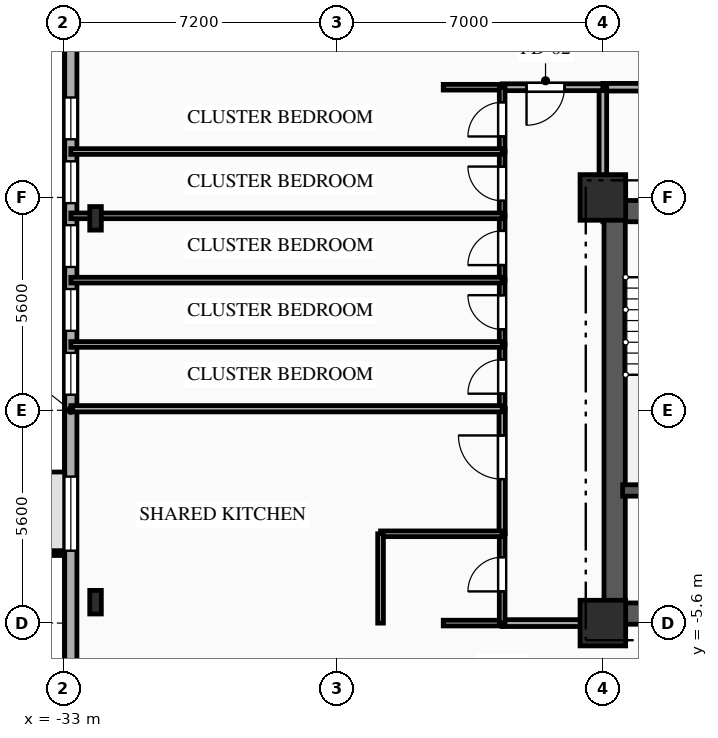
"""IFC4 building model, lengths in metres.
Left out: names, types, materials, properties, quantities, classifications, styles, units other than length and angle.
Written with IfcOpenShell. Run it as: python <this file> out.ifc"""

import sys

from ifc_helpers import new_model, si_unit, direction, frame, frame_2d, origin, origin_2d, place, context, subcontext, project, spatial, rectangle, i_section, extrude, element, fill, save


model = new_model("IFC4")
c1 = context("Model", 3, precision=1e-05, world=origin(), true_north=direction((0.0, 1.0)))
c2 = subcontext(c1, "Body", "Model", "MODEL_VIEW")
j1 = project(units=[si_unit("LENGTHUNIT", "METRE"), si_unit("PLANEANGLEUNIT", "RADIAN")], contexts=[c1])
p1 = place(None, origin())
s1 = spatial("IfcSite", under=j1, at=p1, CompositionType="ELEMENT")
p2 = place(p1, origin())
s2 = spatial("IfcBuilding", under=s1, at=p2, CompositionType="ELEMENT")
p3 = place(p2, frame((0.0, 0.0, 47.1)))
s3 = spatial("IfcBuildingStorey", under=s2, at=p3, CompositionType="ELEMENT", Elevation=47.1)
for number, where, z_axis, x_axis in (
    (1, (-18.8, -5.6, 0.0), (0.0, 0.0, 1.0), (1.0, 0.0, 0.0)),
    (2, (-18.8, 5.6, 0.0), (0.0, 0.0, 1.0), (1.0, 0.0, 0.0)),
):
    element("IfcColumn", number, at=place(p3, frame(where, z_axis=z_axis, x_axis=x_axis)), inside=s3, PredefinedType="COLUMN", context=c2, shape_type="SweptSolid", body=[
        extrude(rectangle(XDim=1.2, YDim=1.2, at=origin_2d()), origin(), (0.0, 0.0, 1.0), 3.35),
    ])
for number, where, z_axis, x_axis in (
    (3, (-32.15, 5.05, 0.0), (0.0, 0.0, 1.0), (1.0, 0.0, 0.0)),
    (4, (-32.15, -5.05, 0.0), (0.0, 0.0, 1.0), (1.0, 0.0, 0.0)),
):
    element("IfcColumn", number, at=place(p3, frame(where, z_axis=z_axis, x_axis=x_axis)), inside=s3, PredefinedType="COLUMN", context=c2, shape_type="SweptSolid", body=[
        extrude(i_section(OverallWidth=0.305, OverallDepth=0.62, WebThickness=0.021, FlangeThickness=0.04, FilletRadius=0.027, at=origin_2d()), origin(), (0.0, 0.0, 1.0), 3.35),
    ])
p4 = place(p3, frame((-32.8, -15.8, 0.0), z_axis=(0.0, 0.0, 1.0), x_axis=(0.0, 1.0, 0.0)))
e5 = element("IfcWall", 5, at=p4, inside=s3, PredefinedType="SOLIDWALL", context=c2, shape_type="SweptSolid", body=[
    extrude(rectangle(XDim=31.6, YDim=0.32, at=frame_2d((15.8, 0.0))), origin(), (0.0, 0.0, 1.0), 3.035),
])
p5 = place(p4, frame((12.105, 0.0, 0.85)))
e6 = element("IfcOpeningElement", 6, at=p5, cuts=e5, PredefinedType="OPENING", context=c2, shape_type="SweptSolid", body=[
    extrude(rectangle(XDim=1.95, YDim=1.85, at=frame_2d((0.975, 0.925))), frame((0.0, 0.17, 0.0), z_axis=(0.0, -1.0, 0.0), x_axis=(1.0, 0.0, 0.0)), (0.0, 0.0, 1.0), 0.34),
])
p6 = place(p4, frame((16.21, 0.0, 0.85)))
e7 = element("IfcOpeningElement", 7, at=p6, cuts=e5, PredefinedType="OPENING", context=c2, shape_type="SweptSolid", body=[
    extrude(rectangle(XDim=1.1, YDim=1.85, at=frame_2d((0.55, 0.925))), frame((0.0, 0.17, 0.0), z_axis=(0.0, -1.0, 0.0), x_axis=(1.0, 0.0, 0.0)), (0.0, 0.0, 1.0), 0.34),
])
p7 = place(p4, frame((17.89, 0.0, 0.85)))
e8 = element("IfcOpeningElement", 8, at=p7, cuts=e5, PredefinedType="OPENING", context=c2, shape_type="SweptSolid", body=[
    extrude(rectangle(XDim=1.1, YDim=1.85, at=frame_2d((0.55, 0.925))), frame((0.0, 0.17, 0.0), z_axis=(0.0, -1.0, 0.0), x_axis=(1.0, 0.0, 0.0)), (0.0, 0.0, 1.0), 0.34),
])
p8 = place(p4, frame((19.57, 0.0, 0.85)))
e9 = element("IfcOpeningElement", 9, at=p8, cuts=e5, PredefinedType="OPENING", context=c2, shape_type="SweptSolid", body=[
    extrude(rectangle(XDim=1.1, YDim=1.85, at=frame_2d((0.55, 0.925))), frame((0.0, 0.17, 0.0), z_axis=(0.0, -1.0, 0.0), x_axis=(1.0, 0.0, 0.0)), (0.0, 0.0, 1.0), 0.34),
])
p9 = place(p4, frame((21.25, 0.0, 0.85)))
e10 = element("IfcOpeningElement", 10, at=p9, cuts=e5, PredefinedType="OPENING", context=c2, shape_type="SweptSolid", body=[
    extrude(rectangle(XDim=1.1, YDim=1.85, at=frame_2d((0.55, 0.925))), frame((0.0, 0.17, 0.0), z_axis=(0.0, -1.0, 0.0), x_axis=(1.0, 0.0, 0.0)), (0.0, 0.0, 1.0), 0.34),
])
p10 = place(p4, frame((22.93, 0.0, 0.85)))
e11 = element("IfcOpeningElement", 11, at=p10, cuts=e5, PredefinedType="OPENING", context=c2, shape_type="SweptSolid", body=[
    extrude(rectangle(XDim=1.1, YDim=1.85, at=frame_2d((0.55, 0.925))), frame((0.0, 0.17, 0.0), z_axis=(0.0, -1.0, 0.0), x_axis=(1.0, 0.0, 0.0)), (0.0, 0.0, 1.0), 0.34),
])
p11 = place(p3, frame((-18.8, 5.24, 0.0), z_axis=(0.0, 0.0, 1.0), x_axis=(1.0, 0.0, 0.0)))
e12 = element("IfcWall", 12, at=p11, inside=s3, PredefinedType="SHEAR", context=c2, shape_type="SweptSolid", body=[
    extrude(rectangle(XDim=9.6, YDim=0.56, at=frame_2d((4.8, 0.0))), origin(), (0.0, 0.0, 1.0), 3.035),
])
p12 = place(p11, frame((1.55, 0.0, 0.0)))
e13 = element("IfcOpeningElement", 13, at=p12, cuts=e12, PredefinedType="OPENING", context=c2, shape_type="SweptSolid", body=[
    extrude(rectangle(XDim=1.1, YDim=2.15, at=frame_2d((0.55, 1.075))), frame((0.0, 0.29, 0.0), z_axis=(0.0, -1.0, 0.0), x_axis=(1.0, 0.0, 0.0)), (0.0, 0.0, 1.0), 0.58),
])
p13 = place(p11, frame((4.775, 0.0, 0.0)))
e14 = element("IfcOpeningElement", 14, at=p13, cuts=e12, PredefinedType="OPENING", context=c2, shape_type="SweptSolid", body=[
    extrude(rectangle(XDim=1.05, YDim=2.1, at=frame_2d((0.525, 1.05))), frame((0.0, 0.29, 0.0), z_axis=(0.0, -1.0, 0.0), x_axis=(1.0, 0.0, 0.0)), (0.0, 0.0, 1.0), 0.58),
])
p14 = place(p3, frame((-18.8, -5.35, 0.0), z_axis=(0.0, 0.0, 1.0), x_axis=(1.0, 0.0, 0.0)))
e15 = element("IfcWall", 15, at=p14, inside=s3, PredefinedType="SHEAR", context=c2, shape_type="SweptSolid", body=[
    extrude(rectangle(XDim=9.6, YDim=0.56, at=frame_2d((4.8, 0.0))), origin(), (0.0, 0.0, 1.0), 3.035),
])
p15 = place(p14, frame((1.05, 0.0, 0.0)))
e16 = element("IfcOpeningElement", 16, at=p15, cuts=e15, PredefinedType="OPENING", context=c2, shape_type="SweptSolid", body=[
    extrude(rectangle(XDim=0.9, YDim=2.1, at=frame_2d((0.45, 1.05))), frame((0.0, 0.29, 0.0), z_axis=(0.0, -1.0, 0.0), x_axis=(1.0, 0.0, 0.0)), (0.0, 0.0, 1.0), 0.58),
])
p16 = place(p3, frame((-18.49, -5.05, 0.0), z_axis=(0.0, 0.0, 1.0), x_axis=(0.0, 1.0, 0.0)))
e17 = element("IfcWall", 17, at=p16, inside=s3, PredefinedType="SHEAR", context=c2, shape_type="SweptSolid", body=[
    extrude(rectangle(XDim=10.1, YDim=0.56, at=frame_2d((5.05, 0.0))), origin(), (0.0, 0.0, 1.0), 3.035),
])
p17 = place(p3, frame((-18.28, -2.11, 0.0), z_axis=(0.0, 0.0, 1.0), x_axis=(1.0, 0.0, 0.0)))
e18 = element("IfcWall", 18, at=p17, inside=s3, PredefinedType="SHEAR", context=c2, shape_type="SweptSolid", body=[
    extrude(rectangle(XDim=3.18, YDim=0.3, at=frame_2d((1.59, 0.0))), origin(), (0.0, 0.0, 1.0), 3.035),
])
p18 = place(p3, frame((-12.0, 8.5, 0.0), z_axis=(0.0, 0.0, 1.0), x_axis=(-1.0, 0.0, 0.0)))
e19 = element("IfcWall", 19, at=p18, inside=s3, PredefinedType="PARTITIONING", context=c2, shape_type="SweptSolid", body=[
    extrude(rectangle(XDim=6.8, YDim=0.2, at=frame_2d((3.4, 0.0))), origin(), (0.0, 0.0, 1.0), 3.035),
])
p19 = place(p18, frame((1.715, 0.0, 0.0)))
e20 = element("IfcOpeningElement", 20, at=p19, cuts=e19, PredefinedType="OPENING", context=c2, shape_type="SweptSolid", body=[
    extrude(rectangle(XDim=1.1, YDim=2.15, at=frame_2d((0.55, 1.075))), frame((0.0, 0.11, 0.0), z_axis=(0.0, -1.0, 0.0), x_axis=(1.0, 0.0, 0.0)), (0.0, 0.0, 1.0), 0.22),
])
p20 = place(p3, frame((-18.8, 8.5, 0.0), z_axis=(0.0, 0.0, 1.0), x_axis=(0.0, -1.0, 0.0)))
e21 = element("IfcWall", 21, at=p20, inside=s3, PredefinedType="PARTITIONING", context=c2, shape_type="SweptSolid", body=[
    extrude(rectangle(XDim=2.9, YDim=0.2, at=frame_2d((1.45, 0.0))), origin(), (0.0, 0.0, 1.0), 2.52),
])
p21 = place(p3, frame((-18.8, 8.5, 0.0), z_axis=(0.0, 0.0, 1.0), x_axis=(-1.0, 0.0, 0.0)))
e22 = element("IfcWall", 22, at=p21, inside=s3, PredefinedType="PARTITIONING", context=c2, shape_type="SweptSolid", body=[
    extrude(rectangle(XDim=2.65, YDim=0.18, at=frame_2d((1.325, 0.0))), origin(), (0.0, 0.0, 1.0), 3.035),
])
p22 = place(p21, frame((1.009, 0.0, 0.0)))
e23 = element("IfcOpeningElement", 23, at=p22, cuts=e22, PredefinedType="OPENING", context=c2, shape_type="SweptSolid", body=[
    extrude(rectangle(XDim=1.0, YDim=2.15, at=frame_2d((0.5, 1.075))), frame((0.0, 0.1, 0.0), z_axis=(0.0, -1.0, 0.0), x_axis=(1.0, 0.0, 0.0)), (0.0, 0.0, 1.0), 0.2),
])
p23 = place(p3, frame((-21.45, 8.5, 0.0), z_axis=(0.0, 0.0, 1.0), x_axis=(-1.0, 0.0, 0.0)))
e24 = element("IfcWall", 24, at=p23, inside=s3, PredefinedType="PARTITIONING", context=c2, shape_type="SweptSolid", body=[
    extrude(rectangle(XDim=1.55, YDim=0.15, at=frame_2d((0.775, 0.0))), origin(), (0.0, 0.0, 1.0), 3.035),
])
p24 = place(p3, frame((-21.45, -5.6, 0.0), z_axis=(0.0, 0.0, 1.0), x_axis=(1.0, 0.0, 0.0)))
e25 = element("IfcWall", 25, at=p24, inside=s3, PredefinedType="PARTITIONING", context=c2, shape_type="SweptSolid", body=[
    extrude(rectangle(XDim=2.65, YDim=0.18, at=frame_2d((1.325, 0.0))), origin(), (0.0, 0.0, 1.0), 3.035),
])
p25 = place(p3, frame((-23.0, -5.6, 0.0), z_axis=(0.0, 0.0, 1.0), x_axis=(1.0, 0.0, 0.0)))
e26 = element("IfcWall", 26, at=p25, inside=s3, PredefinedType="PLUMBINGWALL", context=c2, shape_type="SweptSolid", body=[
    extrude(rectangle(XDim=1.55, YDim=0.15, at=frame_2d((0.775, 0.0))), origin(), (0.0, 0.0, 1.0), 3.035),
])
p26 = place(p3, frame((-21.45, -5.6, 0.0), z_axis=(0.0, 0.0, 1.0), x_axis=(0.0, 1.0, 0.0)))
e27 = element("IfcWall", 27, at=p26, inside=s3, PredefinedType="PLUMBINGWALL", context=c2, shape_type="SweptSolid", body=[
    extrude(rectangle(XDim=2.35, YDim=0.15, at=frame_2d((1.175, 0.0))), origin(), (0.0, 0.0, 1.0), 3.035),
])
p27 = place(p26, frame((0.834, 0.0, 0.0)))
e28 = element("IfcOpeningElement", 28, at=p27, cuts=e27, PredefinedType="OPENING", context=c2, shape_type="SweptSolid", body=[
    extrude(rectangle(XDim=0.9, YDim=2.1, at=frame_2d((0.45, 1.05))), frame((0.0, 0.085, 0.0), z_axis=(0.0, -1.0, 0.0), x_axis=(1.0, 0.0, 0.0)), (0.0, 0.0, 1.0), 0.17),
])
p28 = place(p3, frame((-21.45, -3.25, 0.0), z_axis=(0.0, 0.0, 1.0), x_axis=(0.0, 1.0, 0.0)))
e29 = element("IfcWall", 29, at=p28, inside=s3, PredefinedType="PARTITIONING", context=c2, shape_type="SweptSolid", body=[
    extrude(rectangle(XDim=3.29, YDim=0.165, at=frame_2d((1.645, 0.0))), origin(), (0.0, 0.0, 1.0), 3.035),
])
p29 = place(p28, frame((1.438, 0.0, 0.0)))
e30 = element("IfcOpeningElement", 30, at=p29, cuts=e29, PredefinedType="OPENING", context=c2, shape_type="SweptSolid", body=[
    extrude(rectangle(XDim=1.15, YDim=2.15, at=frame_2d((0.575, 1.075))), frame((0.0, 0.093, 0.0), z_axis=(0.0, -1.0, 0.0), x_axis=(1.0, 0.0, 0.0)), (0.0, 0.0, 1.0), 0.185),
])
p30 = place(p3, frame((-21.45, 0.04, 0.0), z_axis=(0.0, 0.0, 1.0), x_axis=(0.0, 1.0, 0.0)))
e31 = element("IfcWall", 31, at=p30, inside=s3, PredefinedType="PARTITIONING", context=c2, shape_type="SweptSolid", body=[
    extrude(rectangle(XDim=1.692, YDim=0.15, at=frame_2d((0.846, 0.0))), origin(), (0.0, 0.0, 1.0), 3.035),
])
p31 = place(p30, frame((0.396, 0.0, 0.0)))
e32 = element("IfcOpeningElement", 32, at=p31, cuts=e31, PredefinedType="OPENING", context=c2, shape_type="SweptSolid", body=[
    extrude(rectangle(XDim=0.9, YDim=2.1, at=frame_2d((0.45, 1.05))), frame((0.0, 0.085, 0.0), z_axis=(0.0, -1.0, 0.0), x_axis=(1.0, 0.0, 0.0)), (0.0, 0.0, 1.0), 0.17),
])
p32 = place(p3, frame((-21.45, 1.732, 0.0), z_axis=(0.0, 0.0, 1.0), x_axis=(0.0, 1.0, 0.0)))
e33 = element("IfcWall", 33, at=p32, inside=s3, PredefinedType="PARTITIONING", context=c2, shape_type="SweptSolid", body=[
    extrude(rectangle(XDim=1.692, YDim=0.15, at=frame_2d((0.846, 0.0))), origin(), (0.0, 0.0, 1.0), 3.035),
])
p33 = place(p32, frame((0.396, 0.0, 0.0)))
e34 = element("IfcOpeningElement", 34, at=p33, cuts=e33, PredefinedType="OPENING", context=c2, shape_type="SweptSolid", body=[
    extrude(rectangle(XDim=0.9, YDim=2.1, at=frame_2d((0.45, 1.05))), frame((0.0, 0.085, 0.0), z_axis=(0.0, -1.0, 0.0), x_axis=(1.0, 0.0, 0.0)), (0.0, 0.0, 1.0), 0.17),
])
p34 = place(p3, frame((-21.45, 3.424, 0.0), z_axis=(0.0, 0.0, 1.0), x_axis=(0.0, 1.0, 0.0)))
e35 = element("IfcWall", 35, at=p34, inside=s3, PredefinedType="PARTITIONING", context=c2, shape_type="SweptSolid", body=[
    extrude(rectangle(XDim=1.692, YDim=0.15, at=frame_2d((0.846, 0.0))), origin(), (0.0, 0.0, 1.0), 3.035),
])
p35 = place(p34, frame((0.396, 0.0, 0.0)))
e36 = element("IfcOpeningElement", 36, at=p35, cuts=e35, PredefinedType="OPENING", context=c2, shape_type="SweptSolid", body=[
    extrude(rectangle(XDim=0.9, YDim=2.1, at=frame_2d((0.45, 1.05))), frame((0.0, 0.085, 0.0), z_axis=(0.0, -1.0, 0.0), x_axis=(1.0, 0.0, 0.0)), (0.0, 0.0, 1.0), 0.17),
])
p36 = place(p3, frame((-21.45, 5.116, 0.0), z_axis=(0.0, 0.0, 1.0), x_axis=(0.0, 1.0, 0.0)))
e37 = element("IfcWall", 37, at=p36, inside=s3, PredefinedType="PARTITIONING", context=c2, shape_type="SweptSolid", body=[
    extrude(rectangle(XDim=1.692, YDim=0.15, at=frame_2d((0.846, 0.0))), origin(), (0.0, 0.0, 1.0), 3.035),
])
p37 = place(p36, frame((0.396, 0.0, 0.0)))
e38 = element("IfcOpeningElement", 38, at=p37, cuts=e37, PredefinedType="OPENING", context=c2, shape_type="SweptSolid", body=[
    extrude(rectangle(XDim=0.9, YDim=2.1, at=frame_2d((0.45, 1.05))), frame((0.0, 0.085, 0.0), z_axis=(0.0, -1.0, 0.0), x_axis=(1.0, 0.0, 0.0)), (0.0, 0.0, 1.0), 0.17),
])
p38 = place(p3, frame((-21.45, 6.808, 0.0), z_axis=(0.0, 0.0, 1.0), x_axis=(0.0, 1.0, 0.0)))
e39 = element("IfcWall", 39, at=p38, inside=s3, PredefinedType="PARTITIONING", context=c2, shape_type="SweptSolid", body=[
    extrude(rectangle(XDim=1.692, YDim=0.15, at=frame_2d((0.846, 0.0))), origin(), (0.0, 0.0, 1.0), 3.035),
])
p39 = place(p38, frame((0.396, 0.0, 0.0)))
e40 = element("IfcOpeningElement", 40, at=p39, cuts=e39, PredefinedType="OPENING", context=c2, shape_type="SweptSolid", body=[
    extrude(rectangle(XDim=0.9, YDim=2.1, at=frame_2d((0.45, 1.05))), frame((0.0, 0.085, 0.0), z_axis=(0.0, -1.0, 0.0), x_axis=(1.0, 0.0, 0.0)), (0.0, 0.0, 1.0), 0.17),
])
p40 = place(p3, frame((-24.65, -3.25, 0.0), z_axis=(0.0, 0.0, 1.0), x_axis=(1.0, 0.0, 0.0)))
e41 = element("IfcWall", 41, at=p40, inside=s3, PredefinedType="PLUMBINGWALL", context=c2, shape_type="SweptSolid", body=[
    extrude(rectangle(XDim=3.2, YDim=0.15, at=frame_2d((1.6, 0.0))), origin(), (0.0, 0.0, 1.0), 2.52),
])
p41 = place(p3, frame((-24.65, -5.6, 0.0), z_axis=(0.0, 0.0, 1.0), x_axis=(0.0, 1.0, 0.0)))
e42 = element("IfcWall", 42, at=p41, inside=s3, PredefinedType="PLUMBINGWALL", context=c2, shape_type="SweptSolid", body=[
    extrude(rectangle(XDim=2.35, YDim=0.15, at=frame_2d((1.175, 0.0))), origin(), (0.0, 0.0, 1.0), 3.035),
])
p42 = place(p3, frame((-32.8, 0.04, 0.0), z_axis=(0.0, 0.0, 1.0), x_axis=(1.0, 0.0, 0.0)))
e43 = element("IfcWall", 43, at=p42, inside=s3, PredefinedType="PARTITIONING", context=c2, shape_type="SweptSolid", body=[
    extrude(rectangle(XDim=11.35, YDim=0.165, at=frame_2d((5.675, 0.0))), origin(), (0.0, 0.0, 1.0), 3.035),
])
p43 = place(p3, frame((-32.8, 1.732, 0.0), z_axis=(0.0, 0.0, 1.0), x_axis=(1.0, 0.0, 0.0)))
e44 = element("IfcWall", 44, at=p43, inside=s3, PredefinedType="PARTITIONING", context=c2, shape_type="SweptSolid", body=[
    extrude(rectangle(XDim=11.35, YDim=0.15, at=frame_2d((5.675, 0.0))), origin(), (0.0, 0.0, 1.0), 3.035),
])
for number, where, z_axis, x_axis in (
    (45, (-32.8, 3.424, 0.0), (0.0, 0.0, 1.0), (1.0, 0.0, 0.0)),
    (46, (-32.8, 5.116, 0.0), (0.0, 0.0, 1.0), (1.0, 0.0, 0.0)),
):
    element("IfcWall", number, at=place(p3, frame(where, z_axis=z_axis, x_axis=x_axis)), inside=s3, PredefinedType="PARTITIONING", context=c2, shape_type="SweptSolid", body=[
        extrude(rectangle(XDim=11.35, YDim=0.15, at=frame_2d((5.675, 0.0))), origin(), (0.0, 0.0, 1.0), 2.52),
    ])
p44 = place(p3, frame((-32.8, 6.808, 0.0), z_axis=(0.0, 0.0, 1.0), x_axis=(1.0, 0.0, 0.0)))
e47 = element("IfcWall", 47, at=p44, inside=s3, PredefinedType="PARTITIONING", context=c2, shape_type="SweptSolid", body=[
    extrude(rectangle(XDim=11.35, YDim=0.15, at=frame_2d((5.675, 0.0))), origin(), (0.0, 0.0, 1.0), 3.035),
])
p45 = place(p5, origin())
e48 = element("IfcWindow", 48, at=p45, inside=s3, PartitioningType="SINGLE_PANEL", PredefinedType="WINDOW", context=c2, shape_type="SweptSolid", body=[
    extrude(rectangle(XDim=1.95, YDim=1.85, at=frame_2d((0.975, 0.925))), frame((0.0, 0.03, 0.0), z_axis=(0.0, -1.0, 0.0), x_axis=(1.0, 0.0, 0.0)), (0.0, 0.0, 1.0), 0.06),
])
fill(e6, e48)
p46 = place(p6, origin())
e49 = element("IfcWindow", 49, at=p46, inside=s3, PartitioningType="SINGLE_PANEL", PredefinedType="WINDOW", context=c2, shape_type="SweptSolid", body=[
    extrude(rectangle(XDim=1.1, YDim=1.85, at=frame_2d((0.55, 0.925))), frame((0.0, 0.03, 0.0), z_axis=(0.0, -1.0, 0.0), x_axis=(1.0, 0.0, 0.0)), (0.0, 0.0, 1.0), 0.06),
])
fill(e7, e49)
p47 = place(p7, origin())
e50 = element("IfcWindow", 50, at=p47, inside=s3, PartitioningType="SINGLE_PANEL", PredefinedType="WINDOW", context=c2, shape_type="SweptSolid", body=[
    extrude(rectangle(XDim=1.1, YDim=1.85, at=frame_2d((0.55, 0.925))), frame((0.0, 0.03, 0.0), z_axis=(0.0, -1.0, 0.0), x_axis=(1.0, 0.0, 0.0)), (0.0, 0.0, 1.0), 0.06),
])
fill(e8, e50)
p48 = place(p8, origin())
e51 = element("IfcWindow", 51, at=p48, inside=s3, PartitioningType="SINGLE_PANEL", PredefinedType="WINDOW", context=c2, shape_type="SweptSolid", body=[
    extrude(rectangle(XDim=1.1, YDim=1.85, at=frame_2d((0.55, 0.925))), frame((0.0, 0.03, 0.0), z_axis=(0.0, -1.0, 0.0), x_axis=(1.0, 0.0, 0.0)), (0.0, 0.0, 1.0), 0.06),
])
fill(e9, e51)
p49 = place(p9, origin())
e52 = element("IfcWindow", 52, at=p49, inside=s3, PartitioningType="SINGLE_PANEL", PredefinedType="WINDOW", context=c2, shape_type="SweptSolid", body=[
    extrude(rectangle(XDim=1.1, YDim=1.85, at=frame_2d((0.55, 0.925))), frame((0.0, 0.03, 0.0), z_axis=(0.0, -1.0, 0.0), x_axis=(1.0, 0.0, 0.0)), (0.0, 0.0, 1.0), 0.06),
])
fill(e10, e52)
p50 = place(p10, origin())
e53 = element("IfcWindow", 53, at=p50, inside=s3, PartitioningType="SINGLE_PANEL", PredefinedType="WINDOW", context=c2, shape_type="SweptSolid", body=[
    extrude(rectangle(XDim=1.1, YDim=1.85, at=frame_2d((0.55, 0.925))), frame((0.0, 0.03, 0.0), z_axis=(0.0, -1.0, 0.0), x_axis=(1.0, 0.0, 0.0)), (0.0, 0.0, 1.0), 0.06),
])
fill(e11, e53)
p51 = place(p22, origin())
e54 = element("IfcDoor", 54, at=p51, inside=s3, OperationType="SINGLE_SWING_RIGHT", PredefinedType="DOOR", context=c2, shape_type="SweptSolid", body=[
    extrude(rectangle(XDim=1.0, YDim=2.15, at=frame_2d((0.5, 1.075))), frame((0.0, 0.025, 0.0), z_axis=(0.0, -1.0, 0.0), x_axis=(1.0, 0.0, 0.0)), (0.0, 0.0, 1.0), 0.05),
])
fill(e23, e54)
p52 = place(p27, origin())
e55 = element("IfcDoor", 55, at=p52, inside=s3, OperationType="SINGLE_SWING_LEFT", PredefinedType="DOOR", context=c2, shape_type="SweptSolid", body=[
    extrude(rectangle(XDim=0.9, YDim=2.1, at=frame_2d((0.45, 1.05))), frame((0.0, 0.025, 0.0), z_axis=(0.0, -1.0, 0.0), x_axis=(1.0, 0.0, 0.0)), (0.0, 0.0, 1.0), 0.05),
])
fill(e28, e55)
p53 = place(p29, origin())
e56 = element("IfcDoor", 56, at=p53, inside=s3, OperationType="SINGLE_SWING_RIGHT", PredefinedType="DOOR", context=c2, shape_type="SweptSolid", body=[
    extrude(rectangle(XDim=1.15, YDim=2.15, at=frame_2d((0.575, 1.075))), frame((0.0, 0.025, 0.0), z_axis=(0.0, -1.0, 0.0), x_axis=(1.0, 0.0, 0.0)), (0.0, 0.0, 1.0), 0.05),
])
fill(e30, e56)
p54 = place(p31, origin())
e57 = element("IfcDoor", 57, at=p54, inside=s3, OperationType="SINGLE_SWING_LEFT", PredefinedType="DOOR", context=c2, shape_type="SweptSolid", body=[
    extrude(rectangle(XDim=0.9, YDim=2.1, at=frame_2d((0.45, 1.05))), frame((0.0, 0.025, 0.0), z_axis=(0.0, -1.0, 0.0), x_axis=(1.0, 0.0, 0.0)), (0.0, 0.0, 1.0), 0.05),
])
fill(e32, e57)
p55 = place(p33, origin())
e58 = element("IfcDoor", 58, at=p55, inside=s3, OperationType="SINGLE_SWING_RIGHT", PredefinedType="DOOR", context=c2, shape_type="SweptSolid", body=[
    extrude(rectangle(XDim=0.9, YDim=2.1, at=frame_2d((0.45, 1.05))), frame((0.0, 0.025, 0.0), z_axis=(0.0, -1.0, 0.0), x_axis=(1.0, 0.0, 0.0)), (0.0, 0.0, 1.0), 0.05),
])
fill(e34, e58)
p56 = place(p35, origin())
e59 = element("IfcDoor", 59, at=p56, inside=s3, OperationType="SINGLE_SWING_LEFT", PredefinedType="DOOR", context=c2, shape_type="SweptSolid", body=[
    extrude(rectangle(XDim=0.9, YDim=2.1, at=frame_2d((0.45, 1.05))), frame((0.0, 0.025, 0.0), z_axis=(0.0, -1.0, 0.0), x_axis=(1.0, 0.0, 0.0)), (0.0, 0.0, 1.0), 0.05),
])
fill(e36, e59)
p57 = place(p37, origin())
e60 = element("IfcDoor", 60, at=p57, inside=s3, OperationType="SINGLE_SWING_RIGHT", PredefinedType="DOOR", context=c2, shape_type="SweptSolid", body=[
    extrude(rectangle(XDim=0.9, YDim=2.1, at=frame_2d((0.45, 1.05))), frame((0.0, 0.025, 0.0), z_axis=(0.0, -1.0, 0.0), x_axis=(1.0, 0.0, 0.0)), (0.0, 0.0, 1.0), 0.05),
])
fill(e38, e60)
p58 = place(p39, origin())
e61 = element("IfcDoor", 61, at=p58, inside=s3, OperationType="SINGLE_SWING_LEFT", PredefinedType="DOOR", context=c2, shape_type="SweptSolid", body=[
    extrude(rectangle(XDim=0.9, YDim=2.1, at=frame_2d((0.45, 1.05))), frame((0.0, 0.025, 0.0), z_axis=(0.0, -1.0, 0.0), x_axis=(1.0, 0.0, 0.0)), (0.0, 0.0, 1.0), 0.05),
])
fill(e40, e61)
save(model, sys.argv[1])
